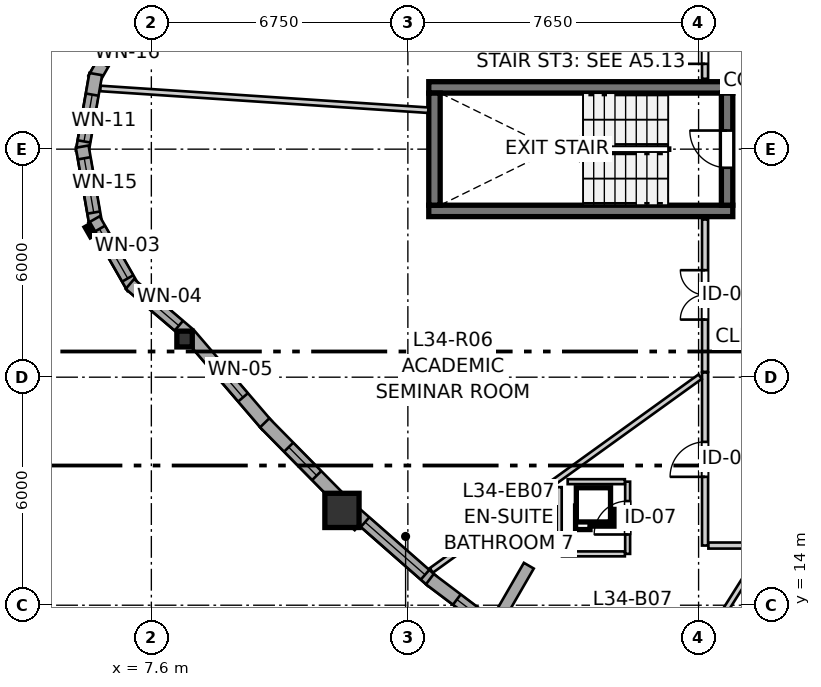
"""IFC4 building model, lengths in metres.
Left out: names, types, materials, properties, quantities, classifications, styles, units other than length and angle.
Written with IfcOpenShell. Run it as: python <this file> out.ifc"""

import sys

from ifc_helpers import new_model, si_unit, direction, frame, frame_2d, origin, origin_2d, place, context, subcontext, project, spatial, rectangle, i_section, extrude, source, transform, mapped, element, fill, save


model = new_model("IFC4")
c1 = context("Model", 3, precision=1e-05, world=origin(), true_north=direction((0.0, 1.0)))
c2 = subcontext(c1, "Body", "Model", "MODEL_VIEW")
j1 = project(units=[si_unit("LENGTHUNIT", "METRE"), si_unit("PLANEANGLEUNIT", "RADIAN")], contexts=[c1])
p1 = place(None, origin())
s1 = spatial("IfcSite", under=j1, at=p1, CompositionType="ELEMENT")
p2 = place(p1, origin())
s2 = spatial("IfcBuilding", under=s1, at=p2, CompositionType="ELEMENT")
p3 = place(p2, frame((0.0, 0.0, 115.2)))
s3 = spatial("IfcBuildingStorey", under=s2, at=p3, CompositionType="ELEMENT", Elevation=115.2)
for number, where, z_axis, x_axis in (
    (1, (14.9, 24.375, 0.0), (0.0, 0.0, 1.0), (1.0, 0.0, 0.0)),
    (2, (22.9, 27.625, 0.0), (0.0, 0.0, 1.0), (-1.0, 0.0, 0.0)),
):
    element("IfcWall", number, at=place(p3, frame(where, z_axis=z_axis, x_axis=x_axis)), inside=s3, PredefinedType="SHEAR", context=c2, shape_type="SweptSolid", body=[
        extrude(rectangle(XDim=8.0, YDim=0.3, at=frame_2d((4.0, 0.0))), origin(), (0.0, 0.0, 1.0), 2.95),
    ])
p4 = place(p3, frame((15.05, 27.475, 0.0), z_axis=(0.0, 0.0, 1.0), x_axis=(0.0, -1.0, 0.0)))
e3 = element("IfcWall", 3, at=p4, inside=s3, PredefinedType="SHEAR", context=c2, shape_type="SweptSolid", body=[
    extrude(rectangle(XDim=2.95, YDim=0.3, at=frame_2d((1.475, 0.0))), origin(), (0.0, 0.0, 1.0), 2.95),
])
p5 = place(p3, frame((22.75, 24.525, 0.0), z_axis=(0.0, 0.0, 1.0), x_axis=(0.0, 1.0, 0.0)))
e4 = element("IfcWall", 4, at=p5, inside=s3, PredefinedType="SHEAR", context=c2, shape_type="SweptSolid", body=[
    extrude(rectangle(XDim=2.95, YDim=0.3, at=frame_2d((1.475, 0.0))), origin(), (0.0, 0.0, 1.0), 2.95),
])
p6 = place(p5, frame((0.985, 0.0, 0.0)))
e5 = element("IfcOpeningElement", 5, at=p6, cuts=e4, PredefinedType="OPENING", context=c2, shape_type="SweptSolid", body=[
    extrude(rectangle(XDim=0.98, YDim=2.15, at=frame_2d((0.49, 1.075))), frame((0.0, 0.16, 0.0), z_axis=(0.0, -1.0, 0.0), x_axis=(1.0, 0.0, 0.0)), (0.0, 0.0, 1.0), 0.32),
])
m1 = source(origin(), c2, "Body", "SweptSolid", [
    extrude(i_section(OverallWidth=0.406, OverallDepth=0.416, WebThickness=0.027, FlangeThickness=0.044, FilletRadius=0.015, at=origin_2d()), origin(), (0.0, 0.0, 1.0), 2.95),
])
p7 = place(p3, frame((8.474, 21.004, 0.0), z_axis=(0.0, 0.0, 1.0), x_axis=(1.0, 0.0, 0.0)))
e6 = element("IfcColumn", 6, at=p7, inside=s3, PredefinedType="PILASTER", context=c2, shape_type="MappedRepresentation", body=[
    mapped(m1, transform((0.0, 0.0, 0.0), x_axis=(1.0, 0.0, 0.0), y_axis=(0.0, 1.0, 0.0), z_axis=(0.0, 0.0, 1.0), scale=1.0)),
])
m2 = source(origin(), c2, "Body", "SweptSolid", [
    extrude(rectangle(XDim=0.9, YDim=0.9, at=origin_2d()), origin(), (0.0, 0.0, 1.0), 2.95),
])
p8 = place(p3, frame((12.616, 16.495, 0.0), z_axis=(0.0, 0.0, 1.0), x_axis=(1.0, 0.0, 0.0)))
e7 = element("IfcColumn", 7, at=p8, inside=s3, PredefinedType="COLUMN", context=c2, shape_type="MappedRepresentation", body=[
    mapped(m2, transform((0.0, 0.0, 0.0), x_axis=(1.0, 0.0, 0.0), y_axis=(0.0, 1.0, 0.0), z_axis=(0.0, 0.0, 1.0), scale=1.0)),
])
p9 = place(p3, frame((7.121, 29.65, 0.0), z_axis=(0.0, 0.0, 1.0), x_axis=(-0.496037473582, -0.868301114132, 0.0)))
e8 = element("IfcWall", 8, at=p9, inside=s3, PredefinedType="SOLIDWALL", context=c2, shape_type="SweptSolid", body=[
    extrude(rectangle(XDim=2.073, YDim=0.34, at=frame_2d((1.037, 0.0))), origin(), (0.0, 0.0, 1.0), 2.48),
])
p10 = place(p9, frame((0.461, 0.0, 0.82)))
e9 = element("IfcOpeningElement", 9, at=p10, cuts=e8, PredefinedType="OPENING", context=c2, shape_type="SweptSolid", body=[
    extrude(rectangle(XDim=1.15, YDim=1.2, at=frame_2d((0.575, 0.6))), frame((0.0, 0.18, 0.0), z_axis=(0.0, -1.0, 0.0), x_axis=(1.0, 0.0, 0.0)), (0.0, 0.0, 1.0), 0.36),
])
p11 = place(p3, frame((6.138, 27.975, 0.0), z_axis=(0.0, 0.0, 1.0), x_axis=(-0.172186061474, -0.985064444711, 0.0)))
e10 = element("IfcWall", 10, at=p11, inside=s3, PredefinedType="SOLIDWALL", context=c2, shape_type="SweptSolid", body=[
    extrude(rectangle(XDim=2.073, YDim=0.34, at=frame_2d((1.037, 0.0))), origin(), (0.0, 0.0, 1.0), 2.48),
])
p12 = place(p11, frame((0.549, 0.0, 0.82)))
e11 = element("IfcOpeningElement", 11, at=p12, cuts=e10, PredefinedType="OPENING", context=c2, shape_type="SweptSolid", body=[
    extrude(rectangle(XDim=1.25, YDim=1.35, at=frame_2d((0.625, 0.675))), frame((0.0, 0.18, 0.0), z_axis=(0.0, -1.0, 0.0), x_axis=(1.0, 0.0, 0.0)), (0.0, 0.0, 1.0), 0.36),
])
p13 = place(p3, frame((5.781, 26.067, 0.0), z_axis=(0.0, 0.0, 1.0), x_axis=(0.172186061474, -0.985064444711, 0.0)))
e12 = element("IfcWall", 12, at=p13, inside=s3, PredefinedType="SOLIDWALL", context=c2, shape_type="SweptSolid", body=[
    extrude(rectangle(XDim=2.073, YDim=0.34, at=frame_2d((1.037, 0.0))), origin(), (0.0, 0.0, 1.0), 2.48),
])
p14 = place(p13, frame((0.312, 0.0, 0.82)))
e13 = element("IfcOpeningElement", 13, at=p14, cuts=e12, PredefinedType="OPENING", context=c2, shape_type="SweptSolid", body=[
    extrude(rectangle(XDim=1.45, YDim=1.25, at=frame_2d((0.725, 0.625))), frame((0.0, 0.18, 0.0), z_axis=(0.0, -1.0, 0.0), x_axis=(1.0, 0.0, 0.0)), (0.0, 0.0, 1.0), 0.36),
])
p15 = place(p3, frame((6.092, 24.15, 0.0), z_axis=(0.0, 0.0, 1.0), x_axis=(0.496037473582, -0.868301114132, 0.0)))
e14 = element("IfcWall", 14, at=p15, inside=s3, PredefinedType="SOLIDWALL", context=c2, shape_type="SweptSolid", body=[
    extrude(rectangle(XDim=2.073, YDim=0.34, at=frame_2d((1.037, 0.0))), origin(), (0.0, 0.0, 1.0), 2.48),
])
p16 = place(p15, frame((0.287, 0.0, 0.82)))
e15 = element("IfcOpeningElement", 15, at=p16, cuts=e14, PredefinedType="OPENING", context=c2, shape_type="SweptSolid", body=[
    extrude(rectangle(XDim=1.5, YDim=1.45, at=frame_2d((0.75, 0.725))), frame((0.0, 0.18, 0.0), z_axis=(0.0, -1.0, 0.0), x_axis=(1.0, 0.0, 0.0)), (0.0, 0.0, 1.0), 0.36),
])
p17 = place(p3, frame((7.035, 22.453, 0.0), z_axis=(0.0, 0.0, 1.0), x_axis=(0.76114353683, -0.648583469063, 0.0)))
e16 = element("IfcWall", 16, at=p17, inside=s3, PredefinedType="SOLIDWALL", context=c2, shape_type="SweptSolid", body=[
    extrude(rectangle(XDim=2.015, YDim=0.34, at=frame_2d((1.007, 0.0))), origin(), (0.0, 0.0, 1.0), 2.48),
])
p18 = place(p17, frame((0.343, 0.0, 0.82)))
e17 = element("IfcOpeningElement", 17, at=p18, cuts=e16, PredefinedType="OPENING", context=c2, shape_type="SweptSolid", body=[
    extrude(rectangle(XDim=1.35, YDim=1.45, at=frame_2d((0.675, 0.725))), frame((0.0, 0.18, 0.0), z_axis=(0.0, -1.0, 0.0), x_axis=(1.0, 0.0, 0.0)), (0.0, 0.0, 1.0), 0.36),
])
p19 = place(p3, frame((8.616, 21.099, 0.0), z_axis=(0.0, 0.0, 1.0), x_axis=(0.650713874475, -0.759323023203, 0.0)))
e18 = element("IfcWall", 18, at=p19, inside=s3, PredefinedType="SOLIDWALL", context=c2, shape_type="SweptSolid", body=[
    extrude(rectangle(XDim=3.113, YDim=0.34, at=frame_2d((1.557, 0.0))), origin(), (0.0, 0.0, 1.0), 2.48),
])
p20 = place(p19, frame((0.947, 0.0, 0.82)))
e19 = element("IfcOpeningElement", 19, at=p20, cuts=e18, PredefinedType="OPENING", context=c2, shape_type="SweptSolid", body=[
    extrude(rectangle(XDim=1.2, YDim=1.45, at=frame_2d((0.6, 0.725))), frame((0.0, 0.18, 0.0), z_axis=(0.0, -1.0, 0.0), x_axis=(1.0, 0.0, 0.0)), (0.0, 0.0, 1.0), 0.36),
])
p21 = place(p3, frame((10.583, 18.8, 0.0), z_axis=(0.0, 0.0, 1.0), x_axis=(0.701884352283, -0.712290920917, 0.0)))
e20 = element("IfcWall", 20, at=p21, inside=s3, PredefinedType="SOLIDWALL", context=c2, shape_type="SweptSolid", body=[
    extrude(rectangle(XDim=2.839, YDim=0.34, at=frame_2d((1.419, 0.0))), origin(), (0.0, 0.0, 1.0), 2.48),
])
p22 = place(p21, frame((0.899, 0.0, 0.82)))
e21 = element("IfcOpeningElement", 21, at=p22, cuts=e20, PredefinedType="OPENING", context=c2, shape_type="SweptSolid", body=[
    extrude(rectangle(XDim=1.05, YDim=1.45, at=frame_2d((0.525, 0.725))), frame((0.0, 0.18, 0.0), z_axis=(0.0, -1.0, 0.0), x_axis=(1.0, 0.0, 0.0)), (0.0, 0.0, 1.0), 0.36),
])
p23 = place(p3, frame((12.901, 16.471, 0.0), z_axis=(0.0, 0.0, 1.0), x_axis=(0.751480442913, -0.659755366722, 0.0)))
e22 = element("IfcWall", 22, at=p23, inside=s3, PredefinedType="SOLIDWALL", context=c2, shape_type="SweptSolid", body=[
    extrude(rectangle(XDim=2.789, YDim=0.34, at=frame_2d((1.395, 0.0))), origin(), (0.0, 0.0, 1.0), 2.48),
])
p24 = place(p23, frame((0.43, 0.0, 0.82)))
e23 = element("IfcOpeningElement", 23, at=p24, cuts=e22, PredefinedType="OPENING", context=c2, shape_type="SweptSolid", body=[
    extrude(rectangle(XDim=2.1, YDim=1.4, at=frame_2d((1.05, 0.7))), frame((0.0, 0.18, 0.0), z_axis=(0.0, -1.0, 0.0), x_axis=(1.0, 0.0, 0.0)), (0.0, 0.0, 1.0), 0.36),
])
p25 = place(p3, frame((14.928, 14.686, 0.0), z_axis=(0.0, 0.0, 1.0), x_axis=(0.798387010211, -0.602144651995, 0.0)))
e24 = element("IfcWall", 24, at=p25, inside=s3, PredefinedType="SOLIDWALL", context=c2, shape_type="SweptSolid", body=[
    extrude(rectangle(XDim=2.966, YDim=0.34, at=frame_2d((1.483, 0.0))), origin(), (0.0, 0.0, 1.0), 2.48),
])
p26 = place(p25, frame((0.891, 0.0, 0.82)))
e25 = element("IfcOpeningElement", 25, at=p26, cuts=e24, PredefinedType="OPENING", context=c2, shape_type="SweptSolid", body=[
    extrude(rectangle(XDim=0.58, YDim=1.35, at=frame_2d((0.29, 0.675))), frame((0.0, 0.18, 0.0), z_axis=(0.0, -1.0, 0.0), x_axis=(1.0, 0.0, 0.0)), (0.0, 0.0, 1.0), 0.36),
])
p27 = place(p3, frame((17.533, 15.04, 0.0), z_axis=(0.0, 0.0, 1.0), x_axis=(-0.499995950774, -0.866027741594, 0.0)))
e26 = element("IfcWall", 26, at=p27, inside=s3, PredefinedType="SOLIDWALL", context=c2, shape_type="SweptSolid", body=[
    extrude(rectangle(XDim=20.091, YDim=0.3, at=frame_2d((10.045, 0.0))), origin(), (0.0, 0.0, 1.0), 2.13),
])
p28 = place(p3, frame((22.17, 15.57, 0.0), z_axis=(0.0, 0.0, 1.0), x_axis=(0.0, 1.0, 0.0)))
e27 = element("IfcWall", 27, at=p28, inside=s3, PredefinedType="PARTITIONING", context=c2, shape_type="SweptSolid", body=[
    extrude(rectangle(XDim=4.555, YDim=0.16, at=frame_2d((2.277, 0.0))), origin(), (0.0, 0.0, 1.0), 2.95),
])
p29 = place(p28, frame((1.808, 0.0, 0.0)))
e28 = element("IfcOpeningElement", 28, at=p29, cuts=e27, PredefinedType="OPENING", context=c2, shape_type="SweptSolid", body=[
    extrude(rectangle(XDim=0.92, YDim=2.1, at=frame_2d((0.46, 1.05))), frame((0.0, 0.09, 0.0), z_axis=(0.0, -1.0, 0.0), x_axis=(1.0, 0.0, 0.0)), (0.0, 0.0, 1.0), 0.18),
])
p30 = place(p3, frame((22.17, 20.14, 0.0), z_axis=(0.0, 0.0, 1.0), x_axis=(0.0, 1.0, 0.0)))
e29 = element("IfcWall", 29, at=p30, inside=s3, PredefinedType="PARTITIONING", context=c2, shape_type="SweptSolid", body=[
    extrude(rectangle(XDim=4.01, YDim=0.16, at=frame_2d((2.005, 0.0))), origin(), (0.0, 0.0, 1.0), 2.95),
])
p31 = place(p30, frame((1.375, 0.0, 0.0)))
e30 = element("IfcOpeningElement", 30, at=p31, cuts=e29, PredefinedType="OPENING", context=c2, shape_type="SweptSolid", body=[
    extrude(rectangle(XDim=1.3, YDim=2.1, at=frame_2d((0.65, 1.05))), frame((0.0, 0.09, 0.0), z_axis=(0.0, -1.0, 0.0), x_axis=(1.0, 0.0, 0.0)), (0.0, 0.0, 1.0), 0.18),
])
p32 = place(p3, frame((22.17, 27.85, 0.0), z_axis=(0.0, 0.0, 1.0), x_axis=(0.0, 1.0, 0.0)))
e31 = element("IfcWall", 31, at=p32, inside=s3, PredefinedType="PARTITIONING", context=c2, shape_type="SweptSolid", body=[
    extrude(rectangle(XDim=2.0, YDim=0.16, at=frame_2d((1.0, 0.0))), origin(), (0.0, 0.0, 1.0), 2.95),
])
p33 = place(p32, frame((0.395, 0.0, 0.0)))
e32 = element("IfcOpeningElement", 32, at=p33, cuts=e31, PredefinedType="OPENING", context=c2, shape_type="SweptSolid", body=[
    extrude(rectangle(XDim=1.3, YDim=2.1, at=frame_2d((0.65, 1.05))), frame((0.0, 0.09, 0.0), z_axis=(0.0, -1.0, 0.0), x_axis=(1.0, 0.0, 0.0)), (0.0, 0.0, 1.0), 0.18),
])
p34 = place(p3, frame((20.133, 15.351, 0.0), z_axis=(0.0, 0.0, 1.0), x_axis=(0.0, 1.0, 0.0)))
e33 = element("IfcWall", 33, at=p34, inside=s3, PredefinedType="PARTITIONING", context=c2, shape_type="SweptSolid", body=[
    extrude(rectangle(XDim=1.9, YDim=0.13, at=frame_2d((0.95, 0.0))), origin(), (0.0, 0.0, 1.0), 2.95),
])
p35 = place(p34, frame((0.51, 0.0, 0.0)))
e34 = element("IfcOpeningElement", 34, at=p35, cuts=e33, PredefinedType="OPENING", context=c2, shape_type="SweptSolid", body=[
    extrude(rectangle(XDim=0.88, YDim=2.05, at=frame_2d((0.44, 1.025))), frame((0.0, 0.075, 0.0), z_axis=(0.0, -1.0, 0.0), x_axis=(1.0, 0.0, 0.0)), (0.0, 0.0, 1.0), 0.15),
])
p36 = place(p3, frame((14.966, 14.915, 0.0), z_axis=(0.0, 0.0, 1.0), x_axis=(0.811310715309, 0.584615192434, 0.0)))
e35 = element("IfcWall", 35, at=p36, inside=s3, PredefinedType="PARTITIONING", context=c2, shape_type="SweptSolid", body=[
    extrude(rectangle(XDim=8.72, YDim=0.145, at=frame_2d((4.36, 0.0))), origin(), (0.0, 0.0, 1.0), 2.118),
])
p37 = place(p3, frame((6.26, 27.597, 0.0), z_axis=(0.0, 0.0, 1.0), x_axis=(0.997805352235, -0.066215398902, 0.0)))
e36 = element("IfcWall", 36, at=p37, inside=s3, PredefinedType="PARTITIONING", context=c2, shape_type="SweptSolid", body=[
    extrude(rectangle(XDim=8.646, YDim=0.145, at=frame_2d((4.323, 0.0))), origin(), (0.0, 0.0, 1.0), 2.95),
])
p38 = place(p3, frame((20.845, 10.914, 0.0), z_axis=(0.0, 0.0, 1.0), x_axis=(0.533007953382, 0.846110230189, 0.0)))
e37 = element("IfcWall", 37, at=p38, inside=s3, PredefinedType="PARTITIONING", context=c2, shape_type="SweptSolid", body=[
    extrude(rectangle(XDim=5.354, YDim=0.145, at=frame_2d((2.677, 0.0))), origin(), (0.0, 0.0, 1.0), 2.95),
])
p39 = place(p3, frame((18.333, 15.351, 0.0), z_axis=(0.0, 0.0, 1.0), x_axis=(0.0, 1.0, 0.0)))
e38 = element("IfcWall", 38, at=p39, inside=s3, PredefinedType="PARTITIONING", context=c2, shape_type="SweptSolid", body=[
    extrude(rectangle(XDim=1.756, YDim=0.13, at=frame_2d((0.878, 0.0))), origin(), (0.0, 0.0, 1.0), 2.95),
])
p40 = place(p3, frame((18.555, 17.251, 0.0), z_axis=(0.0, 0.0, 1.0), x_axis=(1.0, 0.0, 0.0)))
e39 = element("IfcWall", 39, at=p40, inside=s3, PredefinedType="PARTITIONING", context=c2, shape_type="SweptSolid", body=[
    extrude(rectangle(XDim=1.505, YDim=0.13, at=frame_2d((0.752, 0.0))), origin(), (0.0, 0.0, 1.0), 2.95),
])
p41 = place(p3, frame((18.406, 15.351, 0.0), z_axis=(0.0, 0.0, 1.0), x_axis=(1.0, 0.0, 0.0)))
e40 = element("IfcWall", 40, at=p41, inside=s3, PredefinedType="PARTITIONING", context=c2, shape_type="SweptSolid", body=[
    extrude(rectangle(XDim=1.654, YDim=0.13, at=frame_2d((0.827, 0.0))), origin(), (0.0, 0.0, 1.0), 2.95),
])
p42 = place(p3, frame((22.258, 15.57, 0.0), z_axis=(0.0, 0.0, 1.0), x_axis=(1.0, 0.0, 0.0)))
e41 = element("IfcWall", 41, at=p42, inside=s3, PredefinedType="PARTITIONING", context=c2, shape_type="SweptSolid", body=[
    extrude(rectangle(XDim=1.344, YDim=0.16, at=frame_2d((0.672, 0.0))), origin(), (0.0, 0.0, 1.0), 2.95),
])
m3 = source(origin(), c2, "Body", "SweptSolid", [
    extrude(rectangle(XDim=1.15, YDim=1.2, at=frame_2d((0.575, 0.6))), frame((0.0, 0.03, 0.0), z_axis=(0.0, -1.0, 0.0), x_axis=(1.0, 0.0, 0.0)), (0.0, 0.0, 1.0), 0.06),
])
p43 = place(p10, origin())
e42 = element("IfcWindow", 42, at=p43, inside=s3, PartitioningType="SINGLE_PANEL", PredefinedType="WINDOW", context=c2, shape_type="MappedRepresentation", body=[
    mapped(m3, transform((0.0, 0.0, 0.0), x_axis=(1.0, 0.0, 0.0), y_axis=(0.0, 1.0, 0.0), z_axis=(0.0, 0.0, 1.0), scale=1.0)),
])
fill(e9, e42)
m4 = source(origin(), c2, "Body", "SweptSolid", [
    extrude(rectangle(XDim=1.25, YDim=1.35, at=frame_2d((0.625, 0.675))), frame((0.0, 0.03, 0.0), z_axis=(0.0, -1.0, 0.0), x_axis=(1.0, 0.0, 0.0)), (0.0, 0.0, 1.0), 0.06),
])
p44 = place(p12, origin())
e43 = element("IfcWindow", 43, at=p44, inside=s3, PartitioningType="SINGLE_PANEL", PredefinedType="WINDOW", context=c2, shape_type="MappedRepresentation", body=[
    mapped(m4, transform((0.0, 0.0, 0.0), x_axis=(1.0, 0.0, 0.0), y_axis=(0.0, 1.0, 0.0), z_axis=(0.0, 0.0, 1.0), scale=1.0)),
])
fill(e11, e43)
m5 = source(origin(), c2, "Body", "SweptSolid", [
    extrude(rectangle(XDim=1.45, YDim=1.25, at=frame_2d((0.725, 0.625))), frame((0.0, 0.03, 0.0), z_axis=(0.0, -1.0, 0.0), x_axis=(1.0, 0.0, 0.0)), (0.0, 0.0, 1.0), 0.06),
])
p45 = place(p14, origin())
e44 = element("IfcWindow", 44, at=p45, inside=s3, PartitioningType="SINGLE_PANEL", PredefinedType="WINDOW", context=c2, shape_type="MappedRepresentation", body=[
    mapped(m5, transform((0.0, 0.0, 0.0), x_axis=(1.0, 0.0, 0.0), y_axis=(0.0, 1.0, 0.0), z_axis=(0.0, 0.0, 1.0), scale=1.0)),
])
fill(e13, e44)
m6 = source(origin(), c2, "Body", "SweptSolid", [
    extrude(rectangle(XDim=1.5, YDim=1.45, at=frame_2d((0.75, 0.725))), frame((0.0, 0.03, 0.0), z_axis=(0.0, -1.0, 0.0), x_axis=(1.0, 0.0, 0.0)), (0.0, 0.0, 1.0), 0.06),
])
p46 = place(p16, origin())
e45 = element("IfcWindow", 45, at=p46, inside=s3, PartitioningType="SINGLE_PANEL", PredefinedType="WINDOW", context=c2, shape_type="MappedRepresentation", body=[
    mapped(m6, transform((0.0, 0.0, 0.0), x_axis=(1.0, 0.0, 0.0), y_axis=(0.0, 1.0, 0.0), z_axis=(0.0, 0.0, 1.0), scale=1.0)),
])
fill(e15, e45)
m7 = source(origin(), c2, "Body", "SweptSolid", [
    extrude(rectangle(XDim=1.35, YDim=1.45, at=frame_2d((0.675, 0.725))), frame((0.0, 0.03, 0.0), z_axis=(0.0, -1.0, 0.0), x_axis=(1.0, 0.0, 0.0)), (0.0, 0.0, 1.0), 0.06),
])
p47 = place(p18, origin())
e46 = element("IfcWindow", 46, at=p47, inside=s3, PartitioningType="SINGLE_PANEL", PredefinedType="WINDOW", context=c2, shape_type="MappedRepresentation", body=[
    mapped(m7, transform((0.0, 0.0, 0.0), x_axis=(1.0, 0.0, 0.0), y_axis=(0.0, 1.0, 0.0), z_axis=(0.0, 0.0, 1.0), scale=1.0)),
])
fill(e17, e46)
m8 = source(origin(), c2, "Body", "SweptSolid", [
    extrude(rectangle(XDim=1.2, YDim=1.45, at=frame_2d((0.6, 0.725))), frame((0.0, 0.03, 0.0), z_axis=(0.0, -1.0, 0.0), x_axis=(1.0, 0.0, 0.0)), (0.0, 0.0, 1.0), 0.06),
])
p48 = place(p20, origin())
e47 = element("IfcWindow", 47, at=p48, inside=s3, PartitioningType="SINGLE_PANEL", PredefinedType="WINDOW", context=c2, shape_type="MappedRepresentation", body=[
    mapped(m8, transform((0.0, 0.0, 0.0), x_axis=(1.0, 0.0, 0.0), y_axis=(0.0, 1.0, 0.0), z_axis=(0.0, 0.0, 1.0), scale=1.0)),
])
fill(e19, e47)
m9 = source(origin(), c2, "Body", "SweptSolid", [
    extrude(rectangle(XDim=1.05, YDim=1.45, at=frame_2d((0.525, 0.725))), frame((0.0, 0.03, 0.0), z_axis=(0.0, -1.0, 0.0), x_axis=(1.0, 0.0, 0.0)), (0.0, 0.0, 1.0), 0.06),
])
p49 = place(p22, origin())
e48 = element("IfcWindow", 48, at=p49, inside=s3, PartitioningType="SINGLE_PANEL", PredefinedType="WINDOW", context=c2, shape_type="MappedRepresentation", body=[
    mapped(m9, transform((0.0, 0.0, 0.0), x_axis=(1.0, 0.0, 0.0), y_axis=(0.0, 1.0, 0.0), z_axis=(0.0, 0.0, 1.0), scale=1.0)),
])
fill(e21, e48)
m10 = source(origin(), c2, "Body", "SweptSolid", [
    extrude(rectangle(XDim=2.1, YDim=1.4, at=frame_2d((1.05, 0.7))), frame((0.0, 0.03, 0.0), z_axis=(0.0, -1.0, 0.0), x_axis=(1.0, 0.0, 0.0)), (0.0, 0.0, 1.0), 0.06),
])
p50 = place(p24, origin())
e49 = element("IfcWindow", 49, at=p50, inside=s3, PartitioningType="SINGLE_PANEL", PredefinedType="WINDOW", context=c2, shape_type="MappedRepresentation", body=[
    mapped(m10, transform((0.0, 0.0, 0.0), x_axis=(1.0, 0.0, 0.0), y_axis=(0.0, 1.0, 0.0), z_axis=(0.0, 0.0, 1.0), scale=1.0)),
])
fill(e23, e49)
m11 = source(origin(), c2, "Body", "SweptSolid", [
    extrude(rectangle(XDim=0.58, YDim=1.35, at=frame_2d((0.29, 0.675))), frame((0.0, 0.03, 0.0), z_axis=(0.0, -1.0, 0.0), x_axis=(1.0, 0.0, 0.0)), (0.0, 0.0, 1.0), 0.06),
])
p51 = place(p26, origin())
e50 = element("IfcWindow", 50, at=p51, inside=s3, PartitioningType="SINGLE_PANEL", PredefinedType="WINDOW", context=c2, shape_type="MappedRepresentation", body=[
    mapped(m11, transform((0.0, 0.0, 0.0), x_axis=(1.0, 0.0, 0.0), y_axis=(0.0, 1.0, 0.0), z_axis=(0.0, 0.0, 1.0), scale=1.0)),
])
fill(e25, e50)
m12 = source(origin(), c2, "Body", "SweptSolid", [
    extrude(rectangle(XDim=0.98, YDim=2.15, at=frame_2d((0.49, 1.075))), frame((0.0, 0.025, 0.0), z_axis=(0.0, -1.0, 0.0), x_axis=(1.0, 0.0, 0.0)), (0.0, 0.0, 1.0), 0.05),
])
p52 = place(p6, origin())
e51 = element("IfcDoor", 51, at=p52, inside=s3, OperationType="SINGLE_SWING_RIGHT", PredefinedType="DOOR", context=c2, shape_type="MappedRepresentation", body=[
    mapped(m12, transform((0.0, 0.0, 0.0), x_axis=(1.0, 0.0, 0.0), y_axis=(0.0, 1.0, 0.0), z_axis=(0.0, 0.0, 1.0), scale=1.0)),
])
fill(e5, e51)
m13 = source(origin(), c2, "Body", "SweptSolid", [
    extrude(rectangle(XDim=0.92, YDim=2.1, at=frame_2d((0.46, 1.05))), frame((0.0, 0.025, 0.0), z_axis=(0.0, -1.0, 0.0), x_axis=(1.0, 0.0, 0.0)), (0.0, 0.0, 1.0), 0.05),
])
p53 = place(p29, origin())
e52 = element("IfcDoor", 52, at=p53, inside=s3, OperationType="SINGLE_SWING_LEFT", PredefinedType="DOOR", context=c2, shape_type="MappedRepresentation", body=[
    mapped(m13, transform((0.0, 0.0, 0.0), x_axis=(1.0, 0.0, 0.0), y_axis=(0.0, 1.0, 0.0), z_axis=(0.0, 0.0, 1.0), scale=1.0)),
])
fill(e28, e52)
m14 = source(origin(), c2, "Body", "SweptSolid", [
    extrude(rectangle(XDim=1.3, YDim=2.1, at=frame_2d((0.65, 1.05))), frame((0.0, 0.025, 0.0), z_axis=(0.0, -1.0, 0.0), x_axis=(1.0, 0.0, 0.0)), (0.0, 0.0, 1.0), 0.05),
])
p54 = place(p31, origin())
e53 = element("IfcDoor", 53, at=p54, inside=s3, OperationType="DOUBLE_DOOR_SINGLE_SWING", PredefinedType="DOOR", context=c2, shape_type="MappedRepresentation", body=[
    mapped(m14, transform((0.0, 0.0, 0.0), x_axis=(1.0, 0.0, 0.0), y_axis=(0.0, 1.0, 0.0), z_axis=(0.0, 0.0, 1.0), scale=1.0)),
])
fill(e30, e53)
p55 = place(p33, origin())
e54 = element("IfcDoor", 54, at=p55, inside=s3, OperationType="DOUBLE_DOOR_SINGLE_SWING", PredefinedType="DOOR", context=c2, shape_type="MappedRepresentation", body=[
    mapped(m14, transform((0.0, 0.0, 0.0), x_axis=(1.0, 0.0, 0.0), y_axis=(0.0, 1.0, 0.0), z_axis=(0.0, 0.0, 1.0), scale=1.0)),
])
fill(e32, e54)
m15 = source(origin(), c2, "Body", "SweptSolid", [
    extrude(rectangle(XDim=0.88, YDim=2.05, at=frame_2d((0.44, 1.025))), frame((0.0, 0.025, 0.0), z_axis=(0.0, -1.0, 0.0), x_axis=(1.0, 0.0, 0.0)), (0.0, 0.0, 1.0), 0.05),
])
p56 = place(p35, origin())
e55 = element("IfcDoor", 55, at=p56, inside=s3, OperationType="SINGLE_SWING_LEFT", PredefinedType="DOOR", context=c2, shape_type="MappedRepresentation", body=[
    mapped(m15, transform((0.0, 0.0, 0.0), x_axis=(1.0, 0.0, 0.0), y_axis=(0.0, 1.0, 0.0), z_axis=(0.0, 0.0, 1.0), scale=1.0)),
])
fill(e34, e55)
save(model, sys.argv[1])
